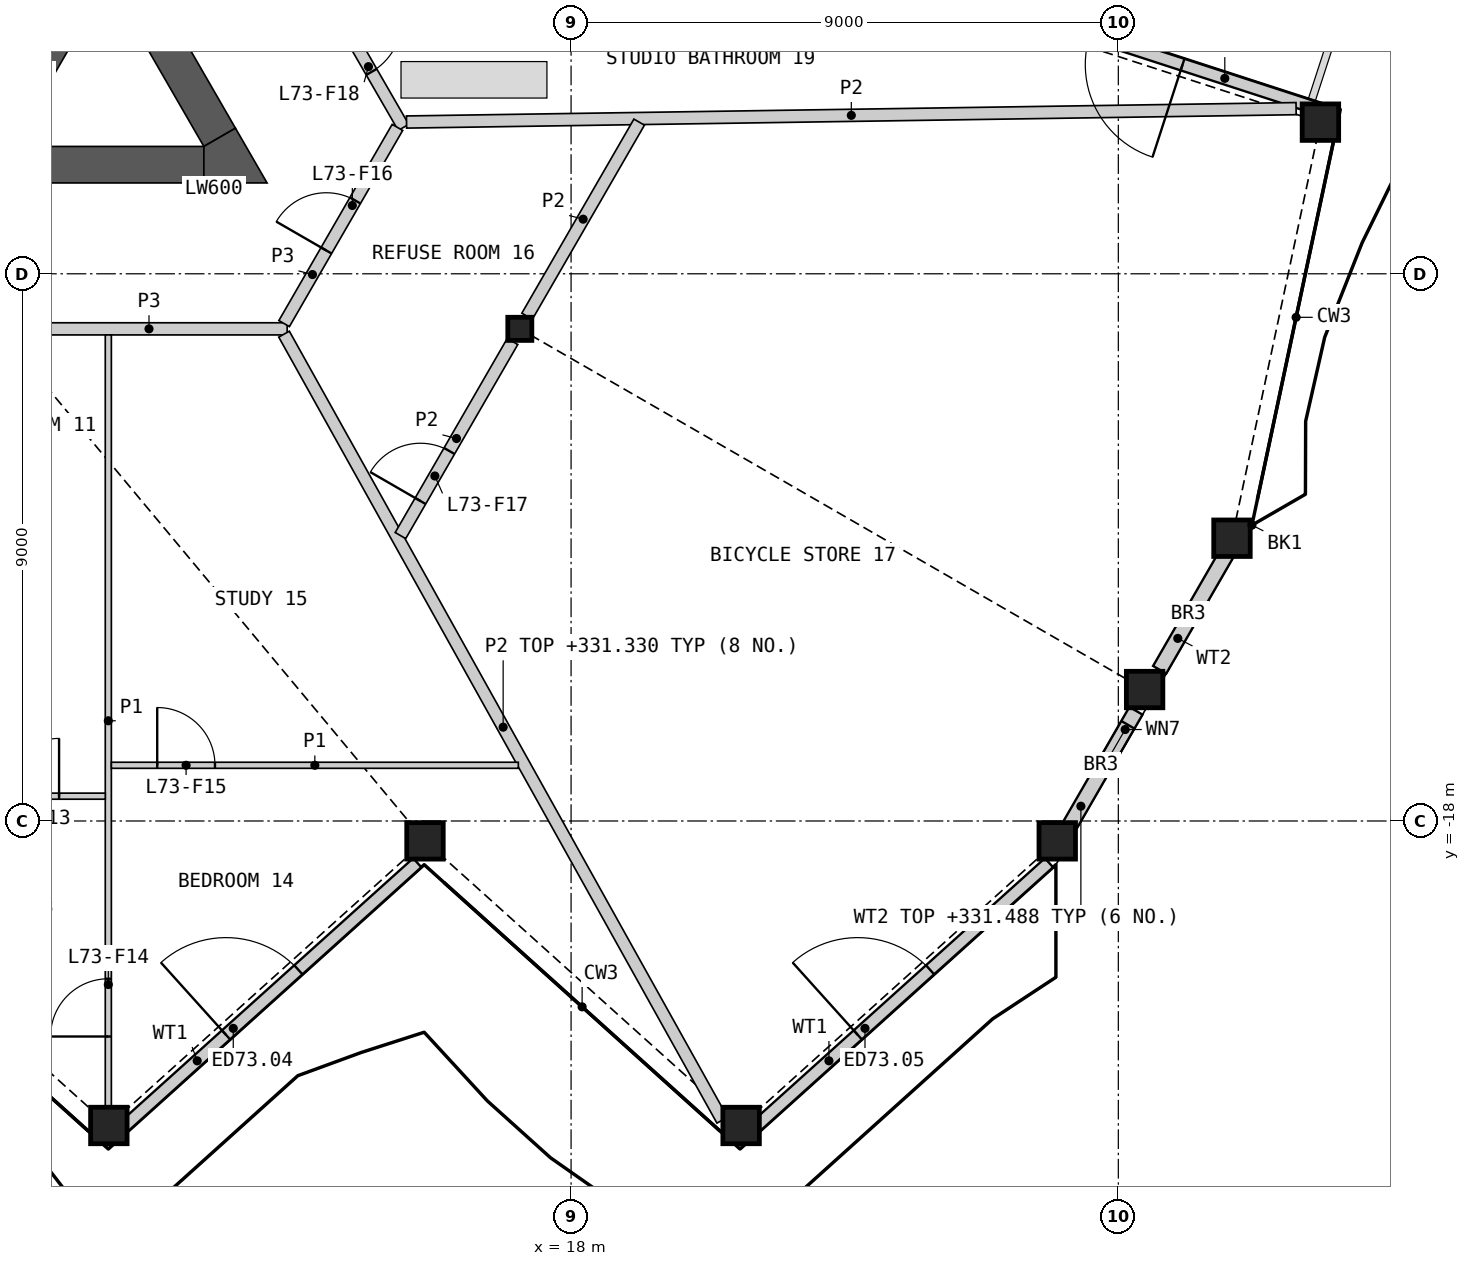
"""IFC4 building model, lengths in metres.
Left out: names, types, materials, properties, quantities, classifications, styles, units other than length and angle.
Written with IfcOpenShell. Run it as: python <this file> out.ifc"""

import sys

from ifc_helpers import new_model, si_unit, direction, frame, frame_2d, origin, origin_2d, place, context, subcontext, project, spatial, polyline, rectangle, hollow_rectangle, i_section, outline, extrude, element, fill, save


model = new_model("IFC4")
c1 = context("Model", 3, precision=1e-05, world=origin(), true_north=direction((0.0, 1.0)))
c2 = subcontext(c1, "Body", "Model", "MODEL_VIEW")
j1 = project(units=[si_unit("LENGTHUNIT", "METRE"), si_unit("PLANEANGLEUNIT", "RADIAN")], contexts=[c1])
p1 = place(None, origin())
s1 = spatial("IfcSite", under=j1, at=p1, CompositionType="ELEMENT")
p2 = place(p1, origin())
s2 = spatial("IfcBuilding", under=s1, at=p2, CompositionType="ELEMENT")
p3 = place(p2, frame((0.0, 0.0, 329.0)))
s3 = spatial("IfcBuildingStorey", under=s2, at=p3, CompositionType="ELEMENT", Elevation=329.0)
for number, where, z_axis, x_axis in (
    (1, (10.398, -23.008, 0.0), (0.0, 0.0, 1.0), (1.0, 0.0, 0.0)),
    (2, (15.597, -18.327, 0.0), (0.0, 0.0, 1.0), (1.0, 0.0, 0.0)),
    (3, (20.796, -23.008, 0.0), (0.0, 0.0, 1.0), (1.0, 0.0, 0.0)),
    (4, (25.995, -18.327, 0.0), (0.0, 0.0, 1.0), (1.0, 0.0, 0.0)),
    (5, (27.432, -15.838, 0.0), (0.0, 0.0, 1.0), (1.0, 0.0, 0.0)),
    (6, (28.869, -13.349, 0.0), (0.0, 0.0, 1.0), (1.0, 0.0, 0.0)),
    (7, (30.324, -6.506, 0.0), (0.0, 0.0, 1.0), (1.0, 0.0, 0.0)),
):
    element("IfcColumn", number, at=place(p3, frame(where, z_axis=z_axis, x_axis=x_axis)), inside=s3, PredefinedType="COLUMN", context=c2, shape_type="SweptSolid", body=[
        extrude(hollow_rectangle(XDim=0.6, YDim=0.6, WallThickness=0.04, at=origin_2d()), origin(), (0.0, 0.0, 1.0), 3.4),
    ])
p4 = place(p3, frame((17.157, -9.906, 0.0), z_axis=(0.0, 0.0, 1.0), x_axis=(1.0, 0.0, 0.0)))
e8 = element("IfcColumn", 8, at=p4, inside=s3, PredefinedType="COLUMN", context=c2, shape_type="SweptSolid", body=[
    extrude(i_section(OverallWidth=0.396, OverallDepth=0.381, WebThickness=0.019, FlangeThickness=0.03, at=origin_2d()), origin(), (0.0, 0.0, 1.0), 3.4),
])
p5 = place(p3, frame((10.645, -23.031, 0.0), z_axis=(0.0, 0.0, 1.0), x_axis=(0.743138937876, 0.669137145145, 0.0)))
e9 = element("IfcWall", 9, at=p5, inside=s3, PredefinedType="SOLIDWALL", context=c2, shape_type="SweptSolid", body=[
    extrude(rectangle(XDim=6.493, YDim=0.2, at=frame_2d((3.246, 0.0))), origin(), (0.0, 0.0, 1.0), 2.488),
])
p6 = place(p5, frame((2.261, 0.0, 0.0)))
e10 = element("IfcOpeningElement", 10, at=p6, cuts=e9, PredefinedType="OPENING", context=c2, shape_type="SweptSolid", body=[
    extrude(rectangle(XDim=1.6, YDim=2.25, at=frame_2d((0.8, 1.125))), frame((0.0, 0.11, 0.0), z_axis=(0.0, -1.0, 0.0), x_axis=(1.0, 0.0, 0.0)), (0.0, 0.0, 1.0), 0.22),
])
p7 = place(p3, frame((21.034, -23.031, 0.0), z_axis=(0.0, 0.0, 1.0), x_axis=(0.743138937876, 0.669137145145, 0.0)))
e11 = element("IfcWall", 11, at=p7, inside=s3, PredefinedType="SOLIDWALL", context=c2, shape_type="SweptSolid", body=[
    extrude(rectangle(XDim=6.493, YDim=0.2, at=frame_2d((3.246, 0.0))), origin(), (0.0, 0.0, 1.0), 2.488),
])
p8 = place(p7, frame((2.261, 0.0, 0.0)))
e12 = element("IfcOpeningElement", 12, at=p8, cuts=e11, PredefinedType="OPENING", context=c2, shape_type="SweptSolid", body=[
    extrude(rectangle(XDim=1.6, YDim=2.25, at=frame_2d((0.8, 1.125))), frame((0.0, 0.11, 0.0), z_axis=(0.0, -1.0, 0.0), x_axis=(1.0, 0.0, 0.0)), (0.0, 0.0, 1.0), 0.22),
])
p9 = place(p3, frame((26.082, -18.28, 0.0), z_axis=(0.0, 0.0, 1.0), x_axis=(0.50001992892, 0.866013897511, 0.0)))
e13 = element("IfcWall", 13, at=p9, inside=s3, PredefinedType="SOLIDWALL", context=c2, shape_type="SweptSolid", body=[
    extrude(rectangle(XDim=2.416, YDim=0.25, at=frame_2d((1.208, 0.0))), origin(), (0.0, 0.0, 1.0), 2.488),
])
p10 = place(p9, frame((1.25, 0.0, 1.6)))
e14 = element("IfcOpeningElement", 14, at=p10, cuts=e13, PredefinedType="OPENING", context=c2, shape_type="SweptSolid", body=[
    extrude(rectangle(XDim=0.9, YDim=0.6, at=frame_2d((0.45, 0.3))), frame((0.0, 0.135, 0.0), z_axis=(0.0, -1.0, 0.0), x_axis=(1.0, 0.0, 0.0)), (0.0, 0.0, 1.0), 0.27),
])
p11 = place(p3, frame((27.68, -15.513, 0.0), z_axis=(0.0, 0.0, 1.0), x_axis=(0.499982446489, 0.866035538072, 0.0)))
e15 = element("IfcWall", 15, at=p11, inside=s3, PredefinedType="SOLIDWALL", context=c2, shape_type="SweptSolid", body=[
    extrude(rectangle(XDim=2.384, YDim=0.25, at=frame_2d((1.192, 0.0))), origin(), (0.0, 0.0, 1.0), 2.488),
])
p12 = place(p3, frame((30.207, -6.258, 0.0), z_axis=(0.0, 0.0, 1.0), x_axis=(-0.951056631566, 0.309016639608, 0.0)))
e16 = element("IfcWall", 16, at=p12, inside=s3, PredefinedType="SOLIDWALL", context=c2, shape_type="SweptSolid", body=[
    extrude(rectangle(XDim=6.122, YDim=0.2, at=frame_2d((3.061, 0.0))), origin(), (0.0, 0.0, 1.0), 2.488),
])
p13 = place(p12, frame((2.261, 0.0, 0.0)))
e17 = element("IfcOpeningElement", 17, at=p13, cuts=e16, PredefinedType="OPENING", context=c2, shape_type="SweptSolid", body=[
    extrude(rectangle(XDim=1.6, YDim=2.25, at=frame_2d((0.8, 1.125))), frame((0.0, 0.11, 0.0), z_axis=(0.0, -1.0, 0.0), x_axis=(1.0, 0.0, 0.0)), (0.0, 0.0, 1.0), 0.22),
])
p14 = place(p3, origin())
e18 = element("IfcWall", 18, at=p14, inside=s3, PredefinedType="SHEAR", context=c2, shape_type="SweptSolid", body=[
    extrude(outline(polyline([(8.83, -6.881), (10.374, -4.206), (10.032, -4.298), (8.738, -6.539), (8.83, -6.881)])), origin(), (0.0, 0.0, 1.0), 3.1),
])
p15 = place(p3, frame((-4.892, -7.206, 0.0), z_axis=(0.0, 0.0, 1.0), x_axis=(1.0, 0.0, 0.0)))
e19 = element("IfcWall", 19, at=p15, inside=s3, PredefinedType="SHEAR", context=c2, shape_type="SweptSolid", body=[
    extrude(rectangle(XDim=16.853, YDim=0.6, at=frame_2d((8.426, 0.0))), origin(), (0.0, 0.0, 1.0), 3.1),
])
p16 = place(p3, frame((12.221, -6.756, 0.0), z_axis=(0.0, 0.0, 1.0), x_axis=(-0.50000604952, 0.866021911064, 0.0)))
e20 = element("IfcWall", 20, at=p16, inside=s3, PredefinedType="SHEAR", context=c2, shape_type="SweptSolid", body=[
    extrude(rectangle(XDim=4.869, YDim=0.6, at=frame_2d((2.434, 0.0))), origin(), (0.0, 0.0, 1.0), 3.1),
])
p17 = place(p3, origin())
e21 = element("IfcWall", 21, at=p17, inside=s3, PredefinedType="SHEAR", context=c2, shape_type="SweptSolid", body=[
    extrude(outline(polyline([(11.961, -7.506), (11.961, -6.906), (12.48, -6.606), (13.0, -7.506), (11.961, -7.506)])), origin(), (0.0, 0.0, 1.0), 3.1),
])
p18 = place(p3, frame((8.786, -9.906, 0.0), z_axis=(0.0, 0.0, 1.0), x_axis=(1.0, 0.0, 0.0)))
e22 = element("IfcWall", 22, at=p18, inside=s3, PredefinedType="PARTITIONING", context=c2, shape_type="SweptSolid", body=[
    extrude(rectangle(XDim=4.545, YDim=0.2, at=frame_2d((2.272, 0.0))), origin(), (0.0, 0.0, 1.0), 3.1),
])
p19 = place(p3, frame((12.988, -2.684, 0.0), z_axis=(0.0, 0.0, 1.0), x_axis=(0.49999094734, -0.866030630277, 0.0)))
e23 = element("IfcWall", 23, at=p19, inside=s3, PredefinedType="PARTITIONING", context=c2, shape_type="SweptSolid", body=[
    extrude(rectangle(XDim=4.513, YDim=0.2, at=frame_2d((2.256, 0.0))), origin(), (0.0, 0.0, 1.0), 3.1),
])
p20 = place(p19, frame((2.459, 0.0, 0.0)))
e24 = element("IfcOpeningElement", 24, at=p20, cuts=e23, PredefinedType="OPENING", context=c2, shape_type="SweptSolid", body=[
    extrude(rectangle(XDim=1.0, YDim=2.1, at=frame_2d((0.5, 1.05))), frame((0.0, 0.11, 0.0), z_axis=(0.0, -1.0, 0.0), x_axis=(1.0, 0.0, 0.0)), (0.0, 0.0, 1.0), 0.22),
])
p21 = place(p3, frame((13.281, -9.819, 0.0), z_axis=(0.0, 0.0, 1.0), x_axis=(0.499958791762, 0.866049194065, 0.0)))
e25 = element("IfcWall", 25, at=p21, inside=s3, PredefinedType="PARTITIONING", context=c2, shape_type="SweptSolid", body=[
    extrude(rectangle(XDim=3.726, YDim=0.2, at=frame_2d((1.863, 0.0))), origin(), (0.0, 0.0, 1.0), 3.1),
])
p22 = place(p21, frame((1.388, 0.0, 0.0)))
e26 = element("IfcOpeningElement", 26, at=p22, cuts=e25, PredefinedType="OPENING", context=c2, shape_type="SweptSolid", body=[
    extrude(rectangle(XDim=0.95, YDim=2.1, at=frame_2d((0.475, 1.05))), frame((0.0, 0.11, 0.0), z_axis=(0.0, -1.0, 0.0), x_axis=(1.0, 0.0, 0.0)), (0.0, 0.0, 1.0), 0.22),
])
p23 = place(p3, frame((13.28, -9.993, 0.0), z_axis=(0.0, 0.0, 1.0), x_axis=(0.486918292843, -0.873447523378, 0.0)))
e27 = element("IfcWall", 27, at=p23, inside=s3, PredefinedType="PARTITIONING", context=c2, shape_type="SweptSolid", body=[
    extrude(rectangle(XDim=14.801, YDim=0.2, at=frame_2d((7.4, 0.0))), origin(), (0.0, 0.0, 1.0), 2.33),
])
p24 = place(p3, frame((15.294, -6.504, 0.0), z_axis=(0.0, 0.0, 1.0), x_axis=(0.999886982846, 0.015034012608, 0.0)))
e28 = element("IfcWall", 28, at=p24, inside=s3, PredefinedType="PARTITIONING", context=c2, shape_type="SweptSolid", body=[
    extrude(rectangle(XDim=14.632, YDim=0.2, at=frame_2d((7.316, 0.0))), origin(), (0.0, 0.0, 1.0), 2.33),
])
p25 = place(p3, frame((15.194, -13.306, 0.0), z_axis=(0.0, 0.0, 1.0), x_axis=(0.50002820729, 0.866009117685, 0.0)))
e29 = element("IfcWall", 29, at=p25, inside=s3, PredefinedType="PARTITIONING", context=c2, shape_type="SweptSolid", body=[
    extrude(rectangle(XDim=3.686, YDim=0.2, at=frame_2d((1.843, 0.0))), origin(), (0.0, 0.0, 1.0), 2.33),
])
p26 = place(p25, frame((0.656, 0.0, 0.0)))
e30 = element("IfcOpeningElement", 30, at=p26, cuts=e29, PredefinedType="OPENING", context=c2, shape_type="SweptSolid", body=[
    extrude(rectangle(XDim=0.95, YDim=2.1, at=frame_2d((0.475, 1.05))), frame((0.0, 0.11, 0.0), z_axis=(0.0, -1.0, 0.0), x_axis=(1.0, 0.0, 0.0)), (0.0, 0.0, 1.0), 0.22),
])
p27 = place(p3, frame((17.277, -9.698, 0.0), z_axis=(0.0, 0.0, 1.0), x_axis=(0.499978535015, 0.866037796245, 0.0)))
e31 = element("IfcWall", 31, at=p27, inside=s3, PredefinedType="PARTITIONING", context=c2, shape_type="SweptSolid", body=[
    extrude(rectangle(XDim=3.686, YDim=0.2, at=frame_2d((1.843, 0.0))), origin(), (0.0, 0.0, 1.0), 2.33),
])
p28 = place(p3, frame((10.389, -22.698, 0.0), z_axis=(0.0, 0.0, 1.0), x_axis=(0.0, 1.0, 0.0)))
e32 = element("IfcWall", 32, at=p28, inside=s3, PredefinedType="PARTITIONING", context=c2, shape_type="SweptSolid", body=[
    extrude(rectangle(XDim=12.692, YDim=0.1, at=frame_2d((6.346, 0.0))), origin(), (0.0, 0.0, 1.0), 2.33),
])
p29 = place(p28, frame((1.153, 0.0, 0.0)))
e33 = element("IfcOpeningElement", 33, at=p29, cuts=e32, PredefinedType="OPENING", context=c2, shape_type="SweptSolid", body=[
    extrude(rectangle(XDim=0.95, YDim=2.1, at=frame_2d((0.475, 1.05))), frame((0.0, 0.06, 0.0), z_axis=(0.0, -1.0, 0.0), x_axis=(1.0, 0.0, 0.0)), (0.0, 0.0, 1.0), 0.12),
])
p30 = place(p3, frame((10.439, -17.084, 0.0), z_axis=(0.0, 0.0, 1.0), x_axis=(1.0, 0.0, 0.0)))
e34 = element("IfcWall", 34, at=p30, inside=s3, PredefinedType="PARTITIONING", context=c2, shape_type="SweptSolid", body=[
    extrude(rectangle(XDim=6.693, YDim=0.1, at=frame_2d((3.346, 0.0))), origin(), (0.0, 0.0, 1.0), 2.33),
])
p31 = place(p30, frame((0.754, 0.0, 0.0)))
e35 = element("IfcOpeningElement", 35, at=p31, cuts=e34, PredefinedType="OPENING", context=c2, shape_type="SweptSolid", body=[
    extrude(rectangle(XDim=0.95, YDim=2.1, at=frame_2d((0.475, 1.05))), frame((0.0, 0.06, 0.0), z_axis=(0.0, -1.0, 0.0), x_axis=(1.0, 0.0, 0.0)), (0.0, 0.0, 1.0), 0.12),
])
p32 = place(p3, frame((5.32, -17.592, 0.0), z_axis=(0.0, 0.0, 1.0), x_axis=(1.0, 0.0, 0.0)))
e36 = element("IfcWall", 36, at=p32, inside=s3, PredefinedType="PARTITIONING", context=c2, shape_type="SweptSolid", body=[
    extrude(rectangle(XDim=5.02, YDim=0.1, at=frame_2d((2.51, 0.0))), origin(), (0.0, 0.0, 1.0), 2.33),
])
p33 = place(p32, frame((3.31, 0.0, 0.0)))
e37 = element("IfcOpeningElement", 37, at=p33, cuts=e36, PredefinedType="OPENING", context=c2, shape_type="SweptSolid", body=[
    extrude(rectangle(XDim=0.95, YDim=2.1, at=frame_2d((0.475, 1.05))), frame((0.0, 0.06, 0.0), z_axis=(0.0, -1.0, 0.0), x_axis=(1.0, 0.0, 0.0)), (0.0, 0.0, 1.0), 0.12),
])
p34 = place(p6, origin())
e38 = element("IfcDoor", 38, at=p34, inside=s3, OperationType="DOUBLE_DOOR_SINGLE_SWING", PredefinedType="DOOR", context=c2, shape_type="SweptSolid", body=[
    extrude(rectangle(XDim=1.6, YDim=2.25, at=frame_2d((0.8, 1.125))), frame((0.0, 0.025, 0.0), z_axis=(0.0, -1.0, 0.0), x_axis=(1.0, 0.0, 0.0)), (0.0, 0.0, 1.0), 0.05),
])
fill(e10, e38)
p35 = place(p8, origin())
e39 = element("IfcDoor", 39, at=p35, inside=s3, OperationType="DOUBLE_DOOR_SINGLE_SWING", PredefinedType="DOOR", context=c2, shape_type="SweptSolid", body=[
    extrude(rectangle(XDim=1.6, YDim=2.25, at=frame_2d((0.8, 1.125))), frame((0.0, 0.025, 0.0), z_axis=(0.0, -1.0, 0.0), x_axis=(1.0, 0.0, 0.0)), (0.0, 0.0, 1.0), 0.05),
])
fill(e12, e39)
p36 = place(p10, origin())
e40 = element("IfcWindow", 40, at=p36, inside=s3, PartitioningType="SINGLE_PANEL", PredefinedType="WINDOW", context=c2, shape_type="SweptSolid", body=[
    extrude(rectangle(XDim=0.9, YDim=0.6, at=frame_2d((0.45, 0.3))), frame((0.0, 0.03, 0.0), z_axis=(0.0, -1.0, 0.0), x_axis=(1.0, 0.0, 0.0)), (0.0, 0.0, 1.0), 0.06),
])
fill(e14, e40)
p37 = place(p13, origin())
e41 = element("IfcDoor", 41, at=p37, inside=s3, OperationType="DOUBLE_DOOR_SINGLE_SWING", PredefinedType="DOOR", context=c2, shape_type="SweptSolid", body=[
    extrude(rectangle(XDim=1.6, YDim=2.25, at=frame_2d((0.8, 1.125))), frame((0.0, 0.025, 0.0), z_axis=(0.0, -1.0, 0.0), x_axis=(1.0, 0.0, 0.0)), (0.0, 0.0, 1.0), 0.05),
])
fill(e17, e41)
p38 = place(p33, origin())
e42 = element("IfcDoor", 42, at=p38, inside=s3, OperationType="SINGLE_SWING_RIGHT", PredefinedType="DOOR", context=c2, shape_type="SweptSolid", body=[
    extrude(rectangle(XDim=0.95, YDim=2.1, at=frame_2d((0.475, 1.05))), frame((0.0, 0.025, 0.0), z_axis=(0.0, -1.0, 0.0), x_axis=(1.0, 0.0, 0.0)), (0.0, 0.0, 1.0), 0.05),
])
fill(e37, e42)
p39 = place(p29, origin())
e43 = element("IfcDoor", 43, at=p39, inside=s3, OperationType="SINGLE_SWING_LEFT", PredefinedType="DOOR", context=c2, shape_type="SweptSolid", body=[
    extrude(rectangle(XDim=0.95, YDim=2.1, at=frame_2d((0.475, 1.05))), frame((0.0, 0.025, 0.0), z_axis=(0.0, -1.0, 0.0), x_axis=(1.0, 0.0, 0.0)), (0.0, 0.0, 1.0), 0.05),
])
fill(e33, e43)
p40 = place(p31, origin())
e44 = element("IfcDoor", 44, at=p40, inside=s3, OperationType="SINGLE_SWING_LEFT", PredefinedType="DOOR", context=c2, shape_type="SweptSolid", body=[
    extrude(rectangle(XDim=0.95, YDim=2.1, at=frame_2d((0.475, 1.05))), frame((0.0, 0.025, 0.0), z_axis=(0.0, -1.0, 0.0), x_axis=(1.0, 0.0, 0.0)), (0.0, 0.0, 1.0), 0.05),
])
fill(e35, e44)
p41 = place(p22, origin())
e45 = element("IfcDoor", 45, at=p41, inside=s3, OperationType="SINGLE_SWING_LEFT", PredefinedType="DOOR", context=c2, shape_type="SweptSolid", body=[
    extrude(rectangle(XDim=0.95, YDim=2.1, at=frame_2d((0.475, 1.05))), frame((0.0, 0.025, 0.0), z_axis=(0.0, -1.0, 0.0), x_axis=(1.0, 0.0, 0.0)), (0.0, 0.0, 1.0), 0.05),
])
fill(e26, e45)
p42 = place(p26, origin())
e46 = element("IfcDoor", 46, at=p42, inside=s3, OperationType="SINGLE_SWING_LEFT", PredefinedType="DOOR", context=c2, shape_type="SweptSolid", body=[
    extrude(rectangle(XDim=0.95, YDim=2.1, at=frame_2d((0.475, 1.05))), frame((0.0, 0.025, 0.0), z_axis=(0.0, -1.0, 0.0), x_axis=(1.0, 0.0, 0.0)), (0.0, 0.0, 1.0), 0.05),
])
fill(e30, e46)
p43 = place(p20, origin())
e47 = element("IfcDoor", 47, at=p43, inside=s3, OperationType="SINGLE_SWING_LEFT", PredefinedType="DOOR", context=c2, shape_type="SweptSolid", body=[
    extrude(rectangle(XDim=1.0, YDim=2.1, at=frame_2d((0.5, 1.05))), frame((0.0, 0.025, 0.0), z_axis=(0.0, -1.0, 0.0), x_axis=(1.0, 0.0, 0.0)), (0.0, 0.0, 1.0), 0.05),
])
fill(e24, e47)
save(model, sys.argv[1])
